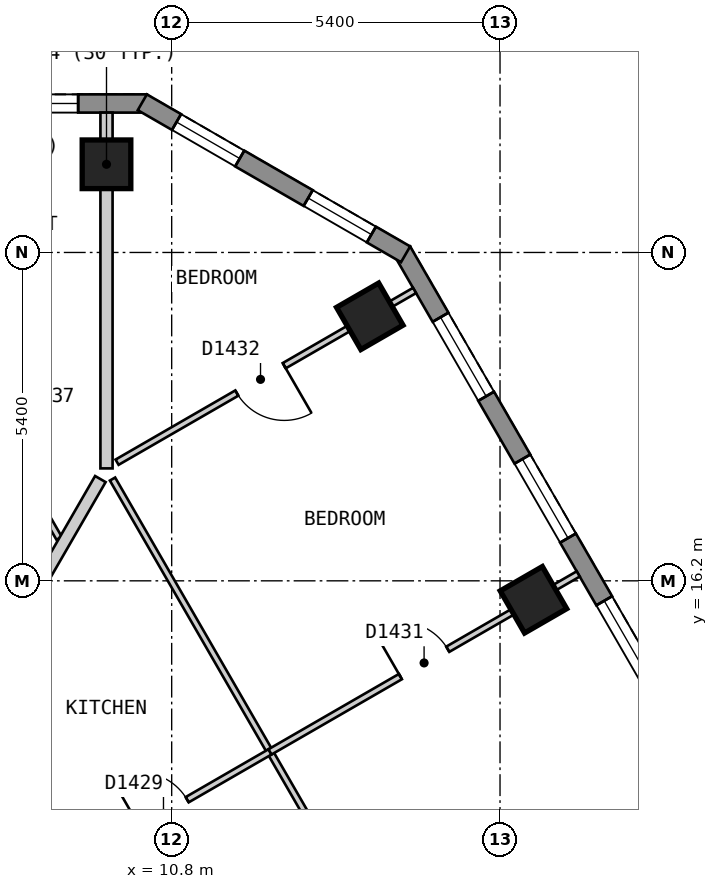
"""IFC4 building model, lengths in metres.
Left out: names, types, materials, properties, quantities, classifications, styles, units other than length and angle.
Written with IfcOpenShell. Run it as: python <this file> out.ifc"""

import sys

from ifc_helpers import new_model, si_unit, direction, frame, frame_2d, origin, origin_2d, place, context, subcontext, project, spatial, polyline, rectangle, outline, extrude, element, fill, save


model = new_model("IFC4")
c1 = context("Model", 3, precision=1e-05, world=origin(), true_north=direction((0.0, 1.0)))
c2 = subcontext(c1, "Body", "Model", "MODEL_VIEW")
j1 = project(units=[si_unit("LENGTHUNIT", "METRE"), si_unit("PLANEANGLEUNIT", "RADIAN")], contexts=[c1])
p1 = place(None, origin())
s1 = spatial("IfcSite", under=j1, at=p1, CompositionType="ELEMENT")
p2 = place(p1, origin())
s2 = spatial("IfcBuilding", under=s1, at=p2, CompositionType="ELEMENT")
p3 = place(p2, frame((0.0, 0.0, 178.2)))
s3 = spatial("IfcBuildingStorey", under=s2, at=p3, CompositionType="ELEMENT", Elevation=178.2)
for number, where, z_axis, x_axis in (
    (1, (9.728, 23.05, 0.0), (0.0, 0.0, 1.0), (-1.0, 0.0, 0.0)),
    (2, (16.75, 15.888, 0.0), (0.0, 0.0, 1.0), (-0.5, 0.866, 0.0)),
    (3, (14.058, 20.55, 0.0), (0.0, 0.0, 1.0), (-0.5, 0.866, 0.0)),
):
    element("IfcColumn", number, at=place(p3, frame(where, z_axis=z_axis, x_axis=x_axis)), inside=s3, PredefinedType="COLUMN", context=c2, shape_type="SweptSolid", body=[
        extrude(rectangle(XDim=0.8, YDim=0.8, at=origin_2d()), origin(), (0.0, 0.0, 1.0), 3.0),
    ])
p4 = place(p3, frame((10.392, 24.05, 0.0), z_axis=(0.0, 0.0, 1.0), x_axis=(-1.0, 0.0, 0.0)))
e4 = element("IfcWall", 4, at=p4, inside=s3, PredefinedType="SOLIDWALL", context=c2, shape_type="SweptSolid", body=[
    extrude(outline(polyline([(0.0, -0.15), (20.784, -0.15), (20.704, 0.15), (0.08, 0.15), (0.0, -0.15)])), origin(), (0.0, 0.0, 1.0), 2.7),
])
p5 = place(p4, frame((1.13, 0.0, 0.15)))
e5 = element("IfcOpeningElement", 5, at=p5, cuts=e4, PredefinedType="OPENING", context=c2, shape_type="SweptSolid", body=[
    extrude(rectangle(XDim=1.5, YDim=2.1, at=frame_2d((0.75, 1.05))), frame((0.0, 0.16, 0.0), z_axis=(0.0, -1.0, 0.0), x_axis=(1.0, 0.0, 0.0)), (0.0, 0.0, 1.0), 0.32),
])
p6 = place(p4, frame((3.562, 0.0, 0.15)))
e6 = element("IfcOpeningElement", 6, at=p6, cuts=e4, PredefinedType="OPENING", context=c2, shape_type="SweptSolid", body=[
    extrude(rectangle(XDim=1.5, YDim=2.1, at=frame_2d((0.75, 1.05))), frame((0.0, 0.16, 0.0), z_axis=(0.0, -1.0, 0.0), x_axis=(1.0, 0.0, 0.0)), (0.0, 0.0, 1.0), 0.32),
])
p7 = place(p4, frame((5.994, 0.0, 0.15)))
e7 = element("IfcOpeningElement", 7, at=p7, cuts=e4, PredefinedType="OPENING", context=c2, shape_type="SweptSolid", body=[
    extrude(rectangle(XDim=1.5, YDim=2.1, at=frame_2d((0.75, 1.05))), frame((0.0, 0.16, 0.0), z_axis=(0.0, -1.0, 0.0), x_axis=(1.0, 0.0, 0.0)), (0.0, 0.0, 1.0), 0.32),
])
p8 = place(p4, frame((8.426, 0.0, 0.15)))
e8 = element("IfcOpeningElement", 8, at=p8, cuts=e4, PredefinedType="OPENING", context=c2, shape_type="SweptSolid", body=[
    extrude(rectangle(XDim=1.5, YDim=2.1, at=frame_2d((0.75, 1.05))), frame((0.0, 0.16, 0.0), z_axis=(0.0, -1.0, 0.0), x_axis=(1.0, 0.0, 0.0)), (0.0, 0.0, 1.0), 0.32),
])
p9 = place(p4, frame((10.858, 0.0, 0.15)))
e9 = element("IfcOpeningElement", 9, at=p9, cuts=e4, PredefinedType="OPENING", context=c2, shape_type="SweptSolid", body=[
    extrude(rectangle(XDim=1.5, YDim=2.1, at=frame_2d((0.75, 1.05))), frame((0.0, 0.16, 0.0), z_axis=(0.0, -1.0, 0.0), x_axis=(1.0, 0.0, 0.0)), (0.0, 0.0, 1.0), 0.32),
])
p10 = place(p4, frame((13.29, 0.0, 0.15)))
e10 = element("IfcOpeningElement", 10, at=p10, cuts=e4, PredefinedType="OPENING", context=c2, shape_type="SweptSolid", body=[
    extrude(rectangle(XDim=1.5, YDim=2.1, at=frame_2d((0.75, 1.05))), frame((0.0, 0.16, 0.0), z_axis=(0.0, -1.0, 0.0), x_axis=(1.0, 0.0, 0.0)), (0.0, 0.0, 1.0), 0.32),
])
p11 = place(p4, frame((15.722, 0.0, 0.15)))
e11 = element("IfcOpeningElement", 11, at=p11, cuts=e4, PredefinedType="OPENING", context=c2, shape_type="SweptSolid", body=[
    extrude(rectangle(XDim=1.5, YDim=2.1, at=frame_2d((0.75, 1.05))), frame((0.0, 0.16, 0.0), z_axis=(0.0, -1.0, 0.0), x_axis=(1.0, 0.0, 0.0)), (0.0, 0.0, 1.0), 0.32),
])
p12 = place(p4, frame((18.154, 0.0, 0.15)))
e12 = element("IfcOpeningElement", 12, at=p12, cuts=e4, PredefinedType="OPENING", context=c2, shape_type="SweptSolid", body=[
    extrude(rectangle(XDim=1.5, YDim=2.1, at=frame_2d((0.75, 1.05))), frame((0.0, 0.16, 0.0), z_axis=(0.0, -1.0, 0.0), x_axis=(1.0, 0.0, 0.0)), (0.0, 0.0, 1.0), 0.32),
])
p13 = place(p3, frame((26.024, 1.825, 0.0), z_axis=(0.0, 0.0, 1.0), x_axis=(-0.500010537973, 0.866019319597, 0.0)))
e13 = element("IfcWall", 13, at=p13, inside=s3, PredefinedType="SOLIDWALL", context=c2, shape_type="SweptSolid", body=[
    extrude(outline(polyline([(0.0, -0.15), (22.863, -0.15), (22.783, 0.15), (0.08, 0.15), (0.0, -0.15)])), origin(), (0.0, 0.0, 1.0), 2.7),
])
p14 = place(p13, frame((1.259, 0.0, 0.15)))
e14 = element("IfcOpeningElement", 14, at=p14, cuts=e13, PredefinedType="OPENING", context=c2, shape_type="SweptSolid", body=[
    extrude(rectangle(XDim=1.5, YDim=2.1, at=frame_2d((0.75, 1.05))), frame((0.0, 0.16, 0.0), z_axis=(0.0, -1.0, 0.0), x_axis=(1.0, 0.0, 0.0)), (0.0, 0.0, 1.0), 0.32),
])
p15 = place(p13, frame((3.952, 0.0, 0.15)))
e15 = element("IfcOpeningElement", 15, at=p15, cuts=e13, PredefinedType="OPENING", context=c2, shape_type="SweptSolid", body=[
    extrude(rectangle(XDim=1.5, YDim=2.1, at=frame_2d((0.75, 1.05))), frame((0.0, 0.16, 0.0), z_axis=(0.0, -1.0, 0.0), x_axis=(1.0, 0.0, 0.0)), (0.0, 0.0, 1.0), 0.32),
])
p16 = place(p13, frame((6.644, 0.0, 0.15)))
e16 = element("IfcOpeningElement", 16, at=p16, cuts=e13, PredefinedType="OPENING", context=c2, shape_type="SweptSolid", body=[
    extrude(rectangle(XDim=1.5, YDim=2.1, at=frame_2d((0.75, 1.05))), frame((0.0, 0.16, 0.0), z_axis=(0.0, -1.0, 0.0), x_axis=(1.0, 0.0, 0.0)), (0.0, 0.0, 1.0), 0.32),
])
p17 = place(p13, frame((9.335, 0.0, 0.15)))
e17 = element("IfcOpeningElement", 17, at=p17, cuts=e13, PredefinedType="OPENING", context=c2, shape_type="SweptSolid", body=[
    extrude(rectangle(XDim=1.5, YDim=2.1, at=frame_2d((0.75, 1.05))), frame((0.0, 0.16, 0.0), z_axis=(0.0, -1.0, 0.0), x_axis=(1.0, 0.0, 0.0)), (0.0, 0.0, 1.0), 0.32),
])
p18 = place(p13, frame((12.028, 0.0, 0.15)))
e18 = element("IfcOpeningElement", 18, at=p18, cuts=e13, PredefinedType="OPENING", context=c2, shape_type="SweptSolid", body=[
    extrude(rectangle(XDim=1.5, YDim=2.1, at=frame_2d((0.75, 1.05))), frame((0.0, 0.16, 0.0), z_axis=(0.0, -1.0, 0.0), x_axis=(1.0, 0.0, 0.0)), (0.0, 0.0, 1.0), 0.32),
])
p19 = place(p13, frame((14.72, 0.0, 0.15)))
e19 = element("IfcOpeningElement", 19, at=p19, cuts=e13, PredefinedType="OPENING", context=c2, shape_type="SweptSolid", body=[
    extrude(rectangle(XDim=1.5, YDim=2.1, at=frame_2d((0.75, 1.05))), frame((0.0, 0.16, 0.0), z_axis=(0.0, -1.0, 0.0), x_axis=(1.0, 0.0, 0.0)), (0.0, 0.0, 1.0), 0.32),
])
p20 = place(p13, frame((17.411, 0.0, 0.15)))
e20 = element("IfcOpeningElement", 20, at=p20, cuts=e13, PredefinedType="OPENING", context=c2, shape_type="SweptSolid", body=[
    extrude(rectangle(XDim=1.5, YDim=2.1, at=frame_2d((0.75, 1.05))), frame((0.0, 0.16, 0.0), z_axis=(0.0, -1.0, 0.0), x_axis=(1.0, 0.0, 0.0)), (0.0, 0.0, 1.0), 0.32),
])
p21 = place(p13, frame((20.104, 0.0, 0.15)))
e21 = element("IfcOpeningElement", 21, at=p21, cuts=e13, PredefinedType="OPENING", context=c2, shape_type="SweptSolid", body=[
    extrude(rectangle(XDim=1.5, YDim=2.1, at=frame_2d((0.75, 1.05))), frame((0.0, 0.16, 0.0), z_axis=(0.0, -1.0, 0.0), x_axis=(1.0, 0.0, 0.0)), (0.0, 0.0, 1.0), 0.32),
])
p22 = place(p3, frame((14.647, 21.57, 0.0), z_axis=(0.0, 0.0, 1.0), x_axis=(-0.866022959057, 0.500004234368, 0.0)))
e22 = element("IfcWall", 22, at=p22, inside=s3, PredefinedType="SOLIDWALL", context=c2, shape_type="SweptSolid", body=[
    extrude(outline(polyline([(0.0, -0.15), (5.0, -0.15), (4.92, 0.15), (0.08, 0.15), (0.0, -0.15)])), origin(), (0.0, 0.0, 1.0), 2.7),
])
p23 = place(p22, frame((0.65, 0.0, 0.15)))
e23 = element("IfcOpeningElement", 23, at=p23, cuts=e22, PredefinedType="OPENING", context=c2, shape_type="SweptSolid", body=[
    extrude(rectangle(XDim=1.2, YDim=2.1, at=frame_2d((0.6, 1.05))), frame((0.0, 0.16, 0.0), z_axis=(0.0, -1.0, 0.0), x_axis=(1.0, 0.0, 0.0)), (0.0, 0.0, 1.0), 0.32),
])
p24 = place(p22, frame((3.15, 0.0, 0.15)))
e24 = element("IfcOpeningElement", 24, at=p24, cuts=e22, PredefinedType="OPENING", context=c2, shape_type="SweptSolid", body=[
    extrude(rectangle(XDim=1.2, YDim=2.1, at=frame_2d((0.6, 1.05))), frame((0.0, 0.16, 0.0), z_axis=(0.0, -1.0, 0.0), x_axis=(1.0, 0.0, 0.0)), (0.0, 0.0, 1.0), 0.32),
])
p25 = place(p3, frame((5.485, 17.3, 0.0), z_axis=(0.0, 0.0, 1.0), x_axis=(0.499965832213, -0.866045129667, 0.0)))
e25 = element("IfcWall", 25, at=p25, inside=s3, PredefinedType="PARTITIONING", context=c2, shape_type="SweptSolid", body=[
    extrude(rectangle(XDim=10.739, YDim=0.2, at=frame_2d((5.369, 0.0))), origin(), (0.0, 0.0, 1.0), 2.7),
])
p26 = place(p25, frame((9.048, 0.0, 0.0)))
e26 = element("IfcOpeningElement", 26, at=p26, cuts=e25, PredefinedType="OPENING", context=c2, shape_type="SweptSolid", body=[
    extrude(rectangle(XDim=1.0, YDim=2.1, at=frame_2d((0.5, 1.05))), frame((0.0, 0.11, 0.0), z_axis=(0.0, -1.0, 0.0), x_axis=(1.0, 0.0, 0.0)), (0.0, 0.0, 1.0), 0.22),
])
p27 = place(p25, frame((0.161, 0.0, 0.0)))
e27 = element("IfcOpeningElement", 27, at=p27, cuts=e25, PredefinedType="OPENING", context=c2, shape_type="SweptSolid", body=[
    extrude(rectangle(XDim=0.9, YDim=2.1, at=frame_2d((0.45, 1.05))), frame((0.0, 0.11, 0.0), z_axis=(0.0, -1.0, 0.0), x_axis=(1.0, 0.0, 0.0)), (0.0, 0.0, 1.0), 0.22),
])
p28 = place(p3, frame((7.073, 20.15, 0.0), z_axis=(0.0, 0.0, 1.0), x_axis=(0.499917691695, -0.866072919292, 0.0)))
e28 = element("IfcWall", 28, at=p28, inside=s3, PredefinedType="PARTITIONING", context=c2, shape_type="SweptSolid", body=[
    extrude(rectangle(XDim=3.753, YDim=0.1, at=frame_2d((1.876, 0.0))), origin(), (0.0, 0.0, 1.0), 2.7),
])
p29 = place(p28, frame((1.432, 0.0, 0.0)))
e29 = element("IfcOpeningElement", 29, at=p29, cuts=e28, PredefinedType="OPENING", context=c2, shape_type="SweptSolid", body=[
    extrude(rectangle(XDim=0.9, YDim=2.1, at=frame_2d((0.45, 1.05))), frame((0.0, 0.06, 0.0), z_axis=(0.0, -1.0, 0.0), x_axis=(1.0, 0.0, 0.0)), (0.0, 0.0, 1.0), 0.12),
])
p30 = place(p3, frame((9.827, 17.874, 0.0), z_axis=(0.0, 0.0, 1.0), x_axis=(0.499962189394, -0.866047232647, 0.0)))
e30 = element("IfcWall", 30, at=p30, inside=s3, PredefinedType="PARTITIONING", context=c2, shape_type="SweptSolid", body=[
    extrude(rectangle(XDim=11.401, YDim=0.1, at=frame_2d((5.701, 0.0))), origin(), (0.0, 0.0, 1.0), 2.7),
])
p31 = place(p30, frame((7.433, 0.0, 0.0)))
e31 = element("IfcOpeningElement", 31, at=p31, cuts=e30, PredefinedType="OPENING", context=c2, shape_type="SweptSolid", body=[
    extrude(rectangle(XDim=0.9, YDim=2.1, at=frame_2d((0.45, 1.05))), frame((0.0, 0.06, 0.0), z_axis=(0.0, -1.0, 0.0), x_axis=(1.0, 0.0, 0.0)), (0.0, 0.0, 1.0), 0.12),
])
p32 = place(p3, frame((8.999, 11.413, 0.0), z_axis=(0.0, 0.0, 1.0), x_axis=(0.865969252911, 0.500097243556, 0.0)))
e32 = element("IfcWall", 32, at=p32, inside=s3, PredefinedType="PARTITIONING", context=c2, shape_type="SweptSolid", body=[
    extrude(rectangle(XDim=3.947, YDim=0.1, at=frame_2d((1.974, 0.0))), origin(), (0.0, 0.0, 1.0), 2.7),
])
p33 = place(p32, frame((1.474, 0.0, 0.0)))
e33 = element("IfcOpeningElement", 33, at=p33, cuts=e32, PredefinedType="OPENING", context=c2, shape_type="SweptSolid", body=[
    extrude(rectangle(XDim=0.9, YDim=2.1, at=frame_2d((0.45, 1.05))), frame((0.0, 0.06, 0.0), z_axis=(0.0, -1.0, 0.0), x_axis=(1.0, 0.0, 0.0)), (0.0, 0.0, 1.0), 0.12),
])
p34 = place(p3, frame((9.902, 18.151, 0.0), z_axis=(0.0, 0.0, 1.0), x_axis=(0.866032278734, 0.499988092049, 0.0)))
e34 = element("IfcWall", 34, at=p34, inside=s3, PredefinedType="PARTITIONING", context=c2, shape_type="SweptSolid", body=[
    extrude(rectangle(XDim=5.649, YDim=0.1, at=frame_2d((2.824, 0.0))), origin(), (0.0, 0.0, 1.0), 2.7),
])
p35 = place(p34, frame((2.274, 0.0, 0.0)))
e35 = element("IfcOpeningElement", 35, at=p35, cuts=e34, PredefinedType="OPENING", context=c2, shape_type="SweptSolid", body=[
    extrude(rectangle(XDim=0.9, YDim=2.1, at=frame_2d((0.45, 1.05))), frame((0.0, 0.06, 0.0), z_axis=(0.0, -1.0, 0.0), x_axis=(1.0, 0.0, 0.0)), (0.0, 0.0, 1.0), 0.12),
])
p36 = place(p3, frame((7.448, 14.1, 0.0), z_axis=(0.0, 0.0, 1.0), x_axis=(0.500013426303, 0.866017651966, 0.0)))
e36 = element("IfcWall", 36, at=p36, inside=s3, PredefinedType="PARTITIONING", context=c2, shape_type="SweptSolid", body=[
    extrude(rectangle(XDim=4.358, YDim=0.2, at=frame_2d((2.179, 0.0))), origin(), (0.0, 0.0, 1.0), 2.7),
])
p37 = place(p3, frame((9.728, 18.049, 0.0), z_axis=(0.0, 0.0, 1.0), x_axis=(0.0, 1.0, 0.0)))
e37 = element("IfcWall", 37, at=p37, inside=s3, PredefinedType="PARTITIONING", context=c2, shape_type="SweptSolid", body=[
    extrude(rectangle(XDim=5.851, YDim=0.2, at=frame_2d((2.925, 0.0))), origin(), (0.0, 0.0, 1.0), 2.7),
])
p38 = place(p3, frame((12.417, 13.387, 0.0), z_axis=(0.0, 0.0, 1.0), x_axis=(0.866070981966, 0.499921047963, 0.0)))
e38 = element("IfcWall", 38, at=p38, inside=s3, PredefinedType="PARTITIONING", context=c2, shape_type="SweptSolid", body=[
    extrude(rectangle(XDim=5.853, YDim=0.1, at=frame_2d((2.927, 0.0))), origin(), (0.0, 0.0, 1.0), 2.7),
])
p39 = place(p38, frame((2.476, 0.0, 0.0)))
e39 = element("IfcOpeningElement", 39, at=p39, cuts=e38, PredefinedType="OPENING", context=c2, shape_type="SweptSolid", body=[
    extrude(rectangle(XDim=0.9, YDim=2.1, at=frame_2d((0.45, 1.05))), frame((0.0, 0.06, 0.0), z_axis=(0.0, -1.0, 0.0), x_axis=(1.0, 0.0, 0.0)), (0.0, 0.0, 1.0), 0.12),
])
p40 = place(p5, origin())
e40 = element("IfcWindow", 40, at=p40, inside=s3, PartitioningType="SINGLE_PANEL", PredefinedType="WINDOW", context=c2, shape_type="SweptSolid", body=[
    extrude(rectangle(XDim=1.5, YDim=2.1, at=frame_2d((0.75, 1.05))), frame((0.0, 0.03, 0.0), z_axis=(0.0, -1.0, 0.0), x_axis=(1.0, 0.0, 0.0)), (0.0, 0.0, 1.0), 0.06),
])
fill(e5, e40)
p41 = place(p19, origin())
e41 = element("IfcWindow", 41, at=p41, inside=s3, PartitioningType="SINGLE_PANEL", PredefinedType="WINDOW", context=c2, shape_type="SweptSolid", body=[
    extrude(rectangle(XDim=1.5, YDim=2.1, at=frame_2d((0.75, 1.05))), frame((0.0, 0.03, 0.0), z_axis=(0.0, -1.0, 0.0), x_axis=(1.0, 0.0, 0.0)), (0.0, 0.0, 1.0), 0.06),
])
fill(e19, e41)
p42 = place(p20, origin())
e42 = element("IfcWindow", 42, at=p42, inside=s3, PartitioningType="SINGLE_PANEL", PredefinedType="WINDOW", context=c2, shape_type="SweptSolid", body=[
    extrude(rectangle(XDim=1.5, YDim=2.1, at=frame_2d((0.75, 1.05))), frame((0.0, 0.03, 0.0), z_axis=(0.0, -1.0, 0.0), x_axis=(1.0, 0.0, 0.0)), (0.0, 0.0, 1.0), 0.06),
])
fill(e20, e42)
p43 = place(p21, origin())
e43 = element("IfcWindow", 43, at=p43, inside=s3, PartitioningType="SINGLE_PANEL", PredefinedType="WINDOW", context=c2, shape_type="SweptSolid", body=[
    extrude(rectangle(XDim=1.5, YDim=2.1, at=frame_2d((0.75, 1.05))), frame((0.0, 0.03, 0.0), z_axis=(0.0, -1.0, 0.0), x_axis=(1.0, 0.0, 0.0)), (0.0, 0.0, 1.0), 0.06),
])
fill(e21, e43)
p44 = place(p23, origin())
e44 = element("IfcWindow", 44, at=p44, inside=s3, PartitioningType="SINGLE_PANEL", PredefinedType="WINDOW", context=c2, shape_type="SweptSolid", body=[
    extrude(rectangle(XDim=1.2, YDim=2.1, at=frame_2d((0.6, 1.05))), frame((0.0, 0.03, 0.0), z_axis=(0.0, -1.0, 0.0), x_axis=(1.0, 0.0, 0.0)), (0.0, 0.0, 1.0), 0.06),
])
fill(e23, e44)
p45 = place(p24, origin())
e45 = element("IfcWindow", 45, at=p45, inside=s3, PartitioningType="SINGLE_PANEL", PredefinedType="WINDOW", context=c2, shape_type="SweptSolid", body=[
    extrude(rectangle(XDim=1.2, YDim=2.1, at=frame_2d((0.6, 1.05))), frame((0.0, 0.03, 0.0), z_axis=(0.0, -1.0, 0.0), x_axis=(1.0, 0.0, 0.0)), (0.0, 0.0, 1.0), 0.06),
])
fill(e24, e45)
p46 = place(p33, origin())
e46 = element("IfcDoor", 46, at=p46, inside=s3, OperationType="SINGLE_SWING_LEFT", PredefinedType="DOOR", context=c2, shape_type="SweptSolid", body=[
    extrude(rectangle(XDim=0.9, YDim=2.1, at=frame_2d((0.45, 1.05))), frame((0.0, 0.025, 0.0), z_axis=(0.0, -1.0, 0.0), x_axis=(1.0, 0.0, 0.0)), (0.0, 0.0, 1.0), 0.05),
])
fill(e33, e46)
p47 = place(p39, origin())
e47 = element("IfcDoor", 47, at=p47, inside=s3, OperationType="SINGLE_SWING_LEFT", PredefinedType="DOOR", context=c2, shape_type="SweptSolid", body=[
    extrude(rectangle(XDim=0.9, YDim=2.1, at=frame_2d((0.45, 1.05))), frame((0.0, 0.025, 0.0), z_axis=(0.0, -1.0, 0.0), x_axis=(1.0, 0.0, 0.0)), (0.0, 0.0, 1.0), 0.05),
])
fill(e39, e47)
p48 = place(p35, origin())
e48 = element("IfcDoor", 48, at=p48, inside=s3, OperationType="SINGLE_SWING_RIGHT", PredefinedType="DOOR", context=c2, shape_type="SweptSolid", body=[
    extrude(rectangle(XDim=0.9, YDim=2.1, at=frame_2d((0.45, 1.05))), frame((0.0, 0.025, 0.0), z_axis=(0.0, -1.0, 0.0), x_axis=(1.0, 0.0, 0.0)), (0.0, 0.0, 1.0), 0.05),
])
fill(e35, e48)
save(model, sys.argv[1])
